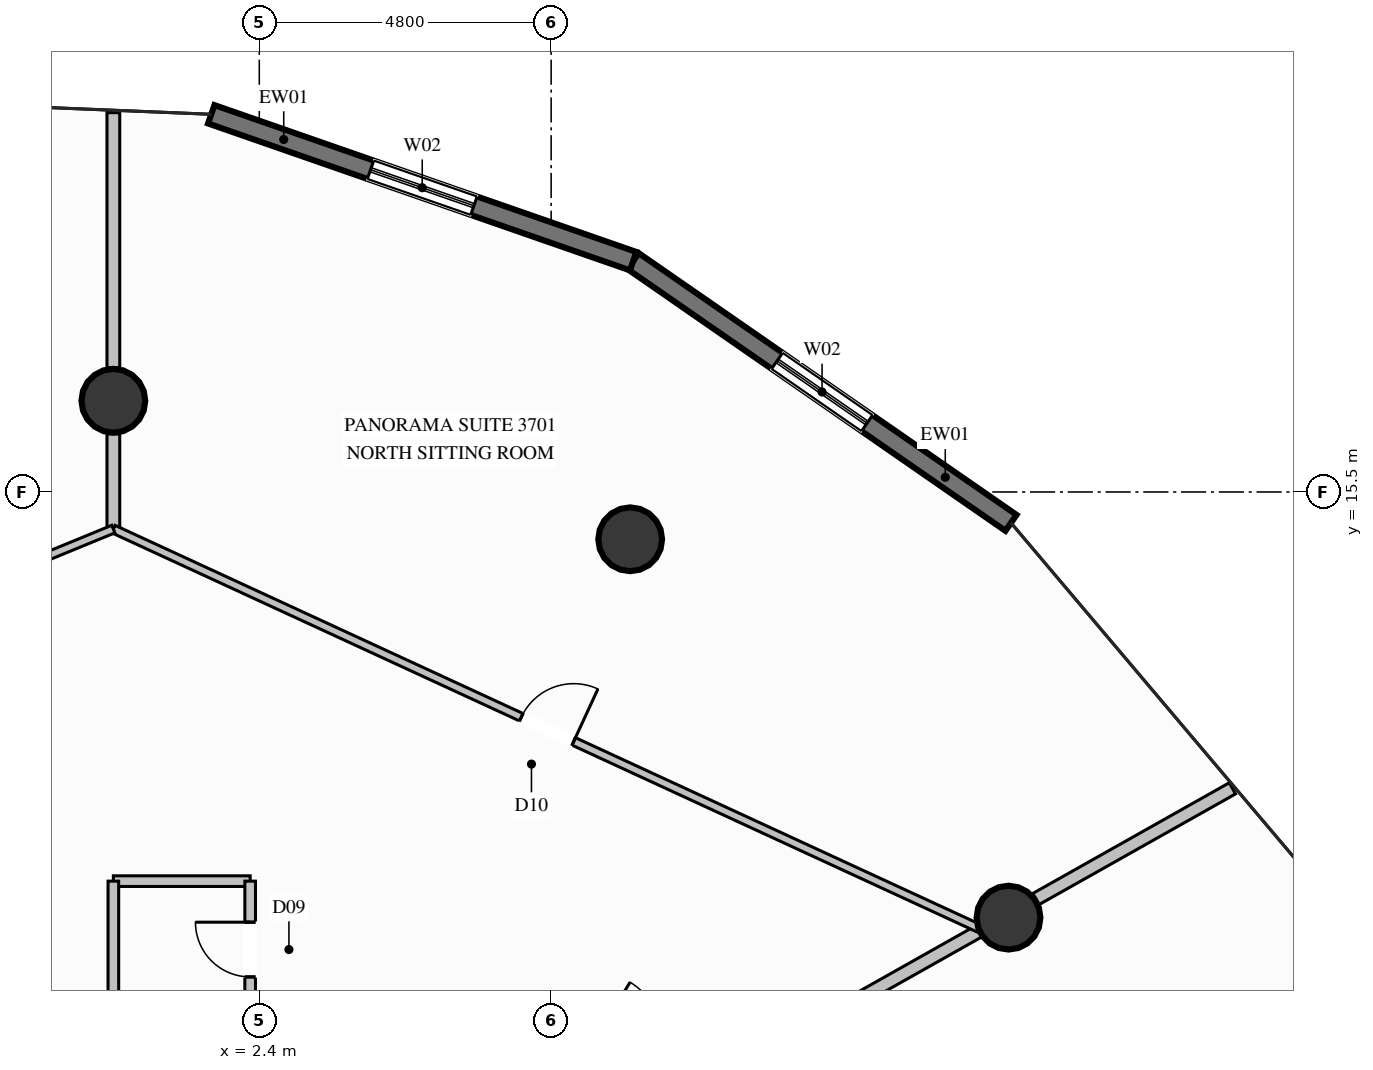
"""IFC4 building model, lengths in metres.
Left out: names, types, materials, properties, quantities, classifications, styles, units other than length and angle.
Written with IfcOpenShell. Run it as: python <this file> out.ifc"""

import sys

from ifc_helpers import new_model, si_unit, direction, frame, frame_2d, origin, origin_2d, place, context, subcontext, project, spatial, rectangle, circle, extrude, element, fill, save


model = new_model("IFC4")
c1 = context("Model", 3, precision=1e-05, world=origin(), true_north=direction((0.0, 1.0)))
c2 = subcontext(c1, "Body", "Model", "MODEL_VIEW")
j1 = project(units=[si_unit("LENGTHUNIT", "METRE"), si_unit("PLANEANGLEUNIT", "RADIAN")], contexts=[c1])
p1 = place(None, origin())
s1 = spatial("IfcSite", under=j1, at=p1, CompositionType="ELEMENT")
p2 = place(p1, origin())
s2 = spatial("IfcBuilding", under=s1, at=p2, CompositionType="ELEMENT")
p3 = place(p2, frame((0.0, 0.0, 138.6)))
s3 = spatial("IfcBuildingStorey", under=s2, at=p3, CompositionType="ELEMENT", Elevation=138.6)
for number, where, z_axis, x_axis in (
    (1, (14.722, 8.5, 0.0), (0.0, 0.0, 1.0), (1.0, 0.0, 0.0)),
    (2, (8.5, 14.722, 0.0), (0.0, 0.0, 1.0), (1.0, 0.0, 0.0)),
    (3, (0.0, 17.0, 0.0), (0.0, 0.0, 1.0), (1.0, 0.0, 0.0)),
):
    element("IfcColumn", number, at=place(p3, frame(where, z_axis=z_axis, x_axis=x_axis)), inside=s3, PredefinedType="COLUMN", context=c2, shape_type="SweptSolid", body=[
        extrude(circle(Radius=0.525, at=origin_2d()), origin(), (0.0, 0.0, 1.0), 3.6),
    ])
p4 = place(p3, frame((8.549, 19.296, 0.0), z_axis=(0.0, 0.0, 1.0), x_axis=(0.822065431331, -0.569393033511, 0.0)))
e4 = element("IfcWall", 4, at=p4, inside=s3, PredefinedType="SOLIDWALL", context=c2, shape_type="SweptSolid", body=[
    extrude(rectangle(XDim=7.559, YDim=0.32, at=frame_2d((3.779, 0.0))), origin(), (0.0, 0.0, 1.0), 3.35),
])
p5 = place(p4, frame((2.879, 0.0, 0.35)))
e5 = element("IfcOpeningElement", 5, at=p5, cuts=e4, PredefinedType="OPENING", context=c2, shape_type="SweptSolid", body=[
    extrude(rectangle(XDim=1.8, YDim=2.6, at=frame_2d((0.9, 1.3))), frame((0.0, 0.17, 0.0), z_axis=(0.0, -1.0, 0.0), x_axis=(1.0, 0.0, 0.0)), (0.0, 0.0, 1.0), 0.34),
])
p6 = place(p3, frame((1.61, 21.711, 0.0), z_axis=(0.0, 0.0, 1.0), x_axis=(0.94443401985, -0.328701052859, 0.0)))
e6 = element("IfcWall", 6, at=p6, inside=s3, PredefinedType="SOLIDWALL", context=c2, shape_type="SweptSolid", body=[
    extrude(rectangle(XDim=7.347, YDim=0.32, at=frame_2d((3.674, 0.0))), origin(), (0.0, 0.0, 1.0), 3.35),
])
p7 = place(p6, frame((2.774, 0.0, 0.35)))
e7 = element("IfcOpeningElement", 7, at=p7, cuts=e6, PredefinedType="OPENING", context=c2, shape_type="SweptSolid", body=[
    extrude(rectangle(XDim=1.8, YDim=2.6, at=frame_2d((0.9, 1.3))), frame((0.0, 0.17, 0.0), z_axis=(0.0, -1.0, 0.0), x_axis=(1.0, 0.0, 0.0)), (0.0, 0.0, 1.0), 0.34),
])
p8 = place(p3, frame((9.44, 5.575, 0.0), z_axis=(0.0, 0.0, 1.0), x_axis=(0.871243078021, 0.490851809613, 0.0)))
e8 = element("IfcWall", 8, at=p8, inside=s3, PredefinedType="PARTITIONING", context=c2, shape_type="SweptSolid", body=[
    extrude(rectangle(XDim=5.495, YDim=0.21, at=frame_2d((2.747, 0.0))), origin(), (0.0, 0.0, 1.0), 2.791),
])
p9 = place(p3, frame((15.173, 8.806, 0.0), z_axis=(0.0, 0.0, 1.0), x_axis=(0.871269436628, 0.490805021162, 0.0)))
e9 = element("IfcWall", 9, at=p9, inside=s3, PredefinedType="PARTITIONING", context=c2, shape_type="SweptSolid", body=[
    extrude(rectangle(XDim=3.708, YDim=0.21, at=frame_2d((1.854, 0.0))), origin(), (0.0, 0.0, 1.0), 3.35),
])
for number, where, z_axis, x_axis in (
    (10, (0.0, 9.1, 0.0), (0.0, 0.0, 1.0), (1.0, 0.0, 0.0)),
    (11, (0.0, 9.1, 0.0), (0.0, 0.0, 1.0), (0.0, -1.0, 0.0)),
):
    element("IfcWall", number, at=place(p3, frame(where, z_axis=z_axis, x_axis=x_axis)), inside=s3, PredefinedType="PLUMBINGWALL", context=c2, shape_type="SweptSolid", body=[
        extrude(rectangle(XDim=2.25, YDim=0.175, at=frame_2d((1.125, 0.0))), origin(), (0.0, 0.0, 1.0), 3.35),
    ])
p10 = place(p3, frame((2.25, 6.85, 0.0), z_axis=(0.0, 0.0, 1.0), x_axis=(0.0, 1.0, 0.0)))
e12 = element("IfcWall", 12, at=p10, inside=s3, PredefinedType="PLUMBINGWALL", context=c2, shape_type="SweptSolid", body=[
    extrude(rectangle(XDim=2.25, YDim=0.175, at=frame_2d((1.125, 0.0))), origin(), (0.0, 0.0, 1.0), 3.35),
])
p11 = place(p10, frame((0.675, 0.0, 0.0)))
e13 = element("IfcOpeningElement", 13, at=p11, cuts=e12, PredefinedType="OPENING", context=c2, shape_type="SweptSolid", body=[
    extrude(rectangle(XDim=0.9, YDim=2.1, at=frame_2d((0.45, 1.05))), frame((0.0, 0.098, 0.0), z_axis=(0.0, -1.0, 0.0), x_axis=(1.0, 0.0, 0.0)), (0.0, 0.0, 1.0), 0.195),
])
p12 = place(p3, frame((0.0, 14.89, 0.0), z_axis=(0.0, 0.0, 1.0), x_axis=(0.0, 1.0, 0.0)))
e14 = element("IfcWall", 14, at=p12, inside=s3, PredefinedType="PARTITIONING", context=c2, shape_type="SweptSolid", body=[
    extrude(rectangle(XDim=1.565, YDim=0.21, at=frame_2d((0.783, 0.0))), origin(), (0.0, 0.0, 1.0), 3.35),
])
p13 = place(p3, frame((0.0, 17.545, 0.0), z_axis=(0.0, 0.0, 1.0), x_axis=(0.0, 1.0, 0.0)))
e15 = element("IfcWall", 15, at=p13, inside=s3, PredefinedType="PARTITIONING", context=c2, shape_type="SweptSolid", body=[
    extrude(rectangle(XDim=4.193, YDim=0.21, at=frame_2d((2.097, 0.0))), origin(), (0.0, 0.0, 1.0), 3.35),
])
p14 = place(p3, frame((0.0, 14.89, 0.0), z_axis=(0.0, 0.0, 1.0), x_axis=(0.908063857852, -0.418831744335, 0.0)))
e16 = element("IfcWall", 16, at=p14, inside=s3, PredefinedType="PARTITIONING", context=c2, shape_type="SweptSolid", body=[
    extrude(rectangle(XDim=15.727, YDim=0.135, at=frame_2d((7.863, 0.0))), origin(), (0.0, 0.0, 1.0), 2.878),
])
p15 = place(p14, frame((7.388, 0.0, 0.0)))
e17 = element("IfcOpeningElement", 17, at=p15, cuts=e16, PredefinedType="OPENING", context=c2, shape_type="SweptSolid", body=[
    extrude(rectangle(XDim=0.95, YDim=2.1, at=frame_2d((0.475, 1.05))), frame((0.0, 0.078, 0.0), z_axis=(0.0, -1.0, 0.0), x_axis=(1.0, 0.0, 0.0)), (0.0, 0.0, 1.0), 0.155),
])
p16 = place(p3, frame((-15.011, 8.724, 0.0), z_axis=(0.0, 0.0, 1.0), x_axis=(0.925008016351, 0.379947588078, 0.0)))
e18 = element("IfcWall", 18, at=p16, inside=s3, PredefinedType="PARTITIONING", context=c2, shape_type="SweptSolid", body=[
    extrude(rectangle(XDim=16.228, YDim=0.135, at=frame_2d((8.114, 0.0))), origin(), (0.0, 0.0, 1.0), 2.878),
])
p17 = place(p16, frame((7.639, 0.0, 0.0)))
e19 = element("IfcOpeningElement", 19, at=p17, cuts=e18, PredefinedType="OPENING", context=c2, shape_type="SweptSolid", body=[
    extrude(rectangle(XDim=0.95, YDim=2.1, at=frame_2d((0.475, 1.05))), frame((0.0, 0.078, 0.0), z_axis=(0.0, -1.0, 0.0), x_axis=(1.0, 0.0, 0.0)), (0.0, 0.0, 1.0), 0.155),
])
p18 = place(p5, origin())
e20 = element("IfcWindow", 20, at=p18, inside=s3, PartitioningType="SINGLE_PANEL", PredefinedType="WINDOW", context=c2, shape_type="SweptSolid", body=[
    extrude(rectangle(XDim=1.8, YDim=2.6, at=frame_2d((0.9, 1.3))), frame((0.0, 0.03, 0.0), z_axis=(0.0, -1.0, 0.0), x_axis=(1.0, 0.0, 0.0)), (0.0, 0.0, 1.0), 0.06),
])
fill(e5, e20)
p19 = place(p7, origin())
e21 = element("IfcWindow", 21, at=p19, inside=s3, PartitioningType="SINGLE_PANEL", PredefinedType="WINDOW", context=c2, shape_type="SweptSolid", body=[
    extrude(rectangle(XDim=1.8, YDim=2.6, at=frame_2d((0.9, 1.3))), frame((0.0, 0.03, 0.0), z_axis=(0.0, -1.0, 0.0), x_axis=(1.0, 0.0, 0.0)), (0.0, 0.0, 1.0), 0.06),
])
fill(e7, e21)
p20 = place(p11, origin())
e22 = element("IfcDoor", 22, at=p20, inside=s3, OperationType="SINGLE_SWING_RIGHT", PredefinedType="DOOR", context=c2, shape_type="SweptSolid", body=[
    extrude(rectangle(XDim=0.9, YDim=2.1, at=frame_2d((0.45, 1.05))), frame((0.0, 0.025, 0.0), z_axis=(0.0, -1.0, 0.0), x_axis=(1.0, 0.0, 0.0)), (0.0, 0.0, 1.0), 0.05),
])
fill(e13, e22)
p21 = place(p15, origin())
e23 = element("IfcDoor", 23, at=p21, inside=s3, OperationType="SINGLE_SWING_RIGHT", PredefinedType="DOOR", context=c2, shape_type="SweptSolid", body=[
    extrude(rectangle(XDim=0.95, YDim=2.1, at=frame_2d((0.475, 1.05))), frame((0.0, 0.025, 0.0), z_axis=(0.0, -1.0, 0.0), x_axis=(1.0, 0.0, 0.0)), (0.0, 0.0, 1.0), 0.05),
])
fill(e17, e23)
save(model, sys.argv[1])
